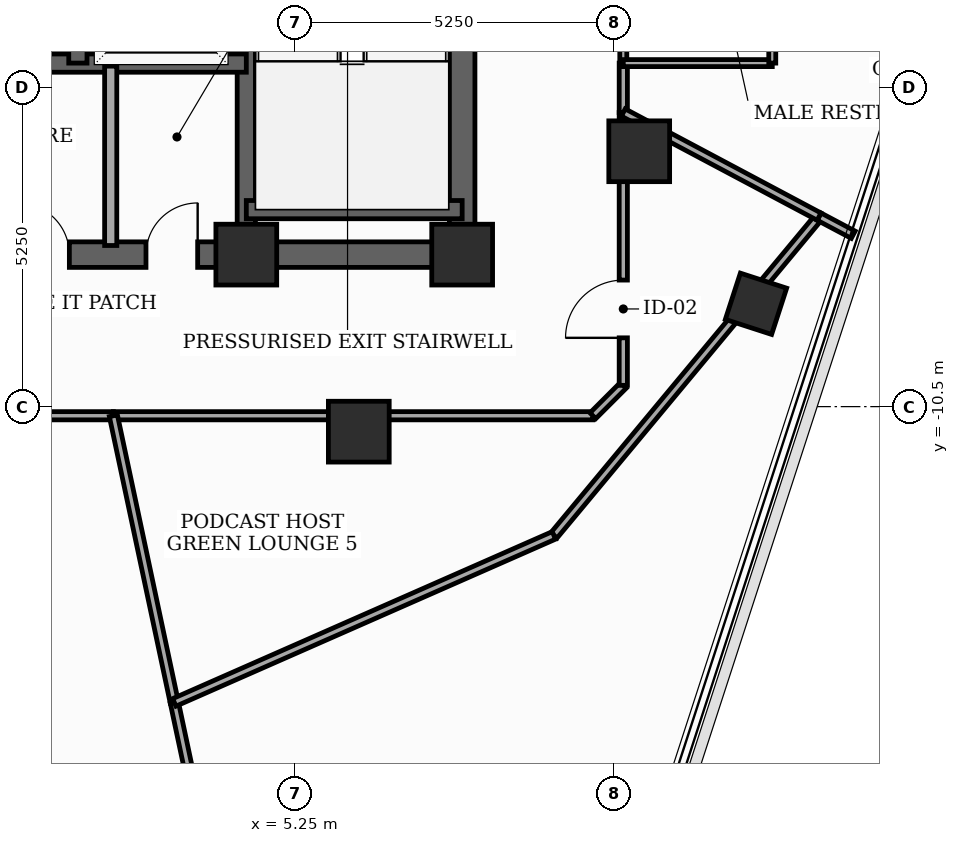
"""IFC4 building model, lengths in metres.
Left out: names, types, materials, properties, quantities, classifications, styles, units other than length and angle.
Written with IfcOpenShell. Run it as: python <this file> out.ifc"""

import sys

from ifc_helpers import new_model, si_unit, direction, frame, frame_2d, origin, origin_2d, place, context, subcontext, project, spatial, rectangle, extrude, element, fill, save


model = new_model("IFC4")
c1 = context("Model", 3, precision=1e-05, world=origin(), true_north=direction((0.0, 1.0)))
c2 = subcontext(c1, "Body", "Model", "MODEL_VIEW")
j1 = project(units=[si_unit("LENGTHUNIT", "METRE"), si_unit("PLANEANGLEUNIT", "RADIAN")], contexts=[c1])
p1 = place(None, origin())
s1 = spatial("IfcSite", under=j1, at=p1, CompositionType="ELEMENT")
p2 = place(p1, origin())
s2 = spatial("IfcBuilding", under=s1, at=p2, CompositionType="ELEMENT")
p3 = place(p2, frame((0.0, 0.0, 309.1)))
s3 = spatial("IfcBuildingStorey", under=s2, at=p3, CompositionType="ELEMENT", Elevation=309.1)
for number, where, z_axis, x_axis in (
    (1, (4.45, -8.0, 0.0), (0.0, 0.0, 1.0), (1.0, 0.0, 0.0)),
    (2, (8.0, -8.0, 0.0), (0.0, 0.0, 1.0), (1.0, 0.0, 0.0)),
    (3, (6.3, -10.912, 0.0), (0.0, 0.0, 1.0), (1.0, 0.0, 0.0)),
    (4, (10.912, -6.3, 0.0), (0.0, 0.0, 1.0), (1.0, 0.0, 0.0)),
):
    element("IfcColumn", number, at=place(p3, frame(where, z_axis=z_axis, x_axis=x_axis)), inside=s3, PredefinedType="COLUMN", context=c2, shape_type="SweptSolid", body=[
        extrude(rectangle(XDim=1.0, YDim=1.0, at=origin_2d()), origin(), (0.0, 0.0, 1.0), 3.7),
    ])
p4 = place(p3, frame((12.833, -8.809, 0.0), z_axis=(0.0, 0.0, 1.0), x_axis=(0.309016994375, 0.951056516295, 0.0)))
e5 = element("IfcColumn", 5, at=p4, inside=s3, PredefinedType="COLUMN", context=c2, shape_type="SweptSolid", body=[
    extrude(rectangle(XDim=0.8, YDim=0.8, at=origin_2d()), origin(), (0.0, 0.0, 1.0), 3.7),
])
p5 = place(p3, frame((8.0, -8.0, 0.0), z_axis=(0.0, 0.0, 1.0), x_axis=(0.0, 1.0, 0.0)))
e6 = element("IfcWall", 6, at=p5, inside=s3, PredefinedType="SHEAR", context=c2, shape_type="SweptSolid", body=[
    extrude(rectangle(XDim=16.0, YDim=0.42, at=frame_2d((8.0, 0.0))), origin(), (0.0, 0.0, 1.0), 3.44),
])
p6 = place(p5, frame((9.6, 0.0, 0.0)))
e7 = element("IfcOpeningElement", 7, at=p6, cuts=e6, PredefinedType="OPENING", context=c2, shape_type="SweptSolid", body=[
    extrude(rectangle(XDim=1.05, YDim=2.15, at=frame_2d((0.525, 1.075))), frame((0.0, 0.22, 0.0), z_axis=(0.0, -1.0, 0.0), x_axis=(1.0, 0.0, 0.0)), (0.0, 0.0, 1.0), 0.44),
])
p7 = place(p5, frame((14.469, 0.0, 0.0)))
e8 = element("IfcOpeningElement", 8, at=p7, cuts=e6, PredefinedType="OPENING", context=c2, shape_type="SweptSolid", body=[
    extrude(rectangle(XDim=0.85, YDim=2.02, at=frame_2d((0.425, 1.01))), frame((0.0, 0.22, 0.0), z_axis=(0.0, -1.0, 0.0), x_axis=(1.0, 0.0, 0.0)), (0.0, 0.0, 1.0), 0.44),
])
p8 = place(p3, frame((-8.0, -8.0, 0.0), z_axis=(0.0, 0.0, 1.0), x_axis=(1.0, 0.0, 0.0)))
e9 = element("IfcWall", 9, at=p8, inside=s3, PredefinedType="SHEAR", context=c2, shape_type="SweptSolid", body=[
    extrude(rectangle(XDim=16.0, YDim=0.42, at=frame_2d((8.0, 0.0))), origin(), (0.0, 0.0, 1.0), 3.44),
])
p9 = place(p8, frame((4.35, 0.0, 0.0)))
e10 = element("IfcOpeningElement", 10, at=p9, cuts=e9, PredefinedType="OPENING", context=c2, shape_type="SweptSolid", body=[
    extrude(rectangle(XDim=0.85, YDim=2.02, at=frame_2d((0.425, 1.01))), frame((0.0, 0.22, 0.0), z_axis=(0.0, -1.0, 0.0), x_axis=(1.0, 0.0, 0.0)), (0.0, 0.0, 1.0), 0.44),
])
p10 = place(p8, frame((6.49, 0.0, 0.0)))
e11 = element("IfcOpeningElement", 11, at=p10, cuts=e9, PredefinedType="OPENING", context=c2, shape_type="SweptSolid", body=[
    extrude(rectangle(XDim=0.85, YDim=2.02, at=frame_2d((0.425, 1.01))), frame((0.0, 0.22, 0.0), z_axis=(0.0, -1.0, 0.0), x_axis=(1.0, 0.0, 0.0)), (0.0, 0.0, 1.0), 0.44),
])
p11 = place(p8, frame((8.69, 0.0, 0.0)))
e12 = element("IfcOpeningElement", 12, at=p11, cuts=e9, PredefinedType="OPENING", context=c2, shape_type="SweptSolid", body=[
    extrude(rectangle(XDim=0.85, YDim=2.02, at=frame_2d((0.425, 1.01))), frame((0.0, 0.22, 0.0), z_axis=(0.0, -1.0, 0.0), x_axis=(1.0, 0.0, 0.0)), (0.0, 0.0, 1.0), 0.44),
])
p12 = place(p8, frame((10.8, 0.0, 0.0)))
e13 = element("IfcOpeningElement", 13, at=p12, cuts=e9, PredefinedType="OPENING", context=c2, shape_type="SweptSolid", body=[
    extrude(rectangle(XDim=0.85, YDim=2.02, at=frame_2d((0.425, 1.01))), frame((0.0, 0.22, 0.0), z_axis=(0.0, -1.0, 0.0), x_axis=(1.0, 0.0, 0.0)), (0.0, 0.0, 1.0), 0.44),
])
p13 = place(p3, frame((4.45, -7.79, 0.0), z_axis=(0.0, 0.0, 1.0), x_axis=(0.0, 1.0, 0.0)))
e14 = element("IfcWall", 14, at=p13, inside=s3, PredefinedType="SHEAR", context=c2, shape_type="SweptSolid", body=[
    extrude(rectangle(XDim=15.58, YDim=0.3, at=frame_2d((7.79, 0.0))), origin(), (0.0, 0.0, 1.0), 3.44),
])
p14 = place(p3, frame((4.45, -7.26, 0.0), z_axis=(0.0, 0.0, 1.0), x_axis=(1.0, 0.0, 0.0)))
e15 = element("IfcWall", 15, at=p14, inside=s3, PredefinedType="SHEAR", context=c2, shape_type="SweptSolid", body=[
    extrude(rectangle(XDim=3.55, YDim=0.3, at=frame_2d((1.775, 0.0))), origin(), (0.0, 0.0, 1.0), 3.44),
])
p15 = place(p3, frame((-4.45, -4.85, 0.0), z_axis=(0.0, 0.0, 1.0), x_axis=(1.0, 0.0, 0.0)))
e16 = element("IfcWall", 16, at=p15, inside=s3, PredefinedType="SHEAR", context=c2, shape_type="SweptSolid", body=[
    extrude(rectangle(XDim=8.9, YDim=0.3, at=frame_2d((4.45, 0.0))), origin(), (0.0, 0.0, 1.0), 3.44),
])
p16 = place(p3, frame((1.68, -4.85, 0.0), z_axis=(0.0, 0.0, 1.0), x_axis=(0.0, 1.0, 0.0)))
e17 = element("IfcWall", 17, at=p16, inside=s3, PredefinedType="SHEAR", context=c2, shape_type="SweptSolid", body=[
    extrude(rectangle(XDim=12.64, YDim=0.3, at=frame_2d((6.32, 0.0))), origin(), (0.0, 0.0, 1.0), 3.44),
])
p17 = place(p16, frame((0.55, 0.0, 0.0)))
e18 = element("IfcOpeningElement", 18, at=p17, cuts=e17, PredefinedType="OPENING", context=c2, shape_type="SweptSolid", body=[
    extrude(rectangle(XDim=1.1, YDim=2.1, at=frame_2d((0.55, 1.05))), frame((0.0, 0.16, 0.0), z_axis=(0.0, -1.0, 0.0), x_axis=(1.0, 0.0, 0.0)), (0.0, 0.0, 1.0), 0.32),
])
p18 = place(p16, frame((2.65, 0.0, 0.0)))
e19 = element("IfcOpeningElement", 19, at=p18, cuts=e17, PredefinedType="OPENING", context=c2, shape_type="SweptSolid", body=[
    extrude(rectangle(XDim=1.1, YDim=2.1, at=frame_2d((0.55, 1.05))), frame((0.0, 0.16, 0.0), z_axis=(0.0, -1.0, 0.0), x_axis=(1.0, 0.0, 0.0)), (0.0, 0.0, 1.0), 0.32),
])
p19 = place(p16, frame((4.75, 0.0, 0.0)))
e20 = element("IfcOpeningElement", 20, at=p19, cuts=e17, PredefinedType="OPENING", context=c2, shape_type="SweptSolid", body=[
    extrude(rectangle(XDim=1.1, YDim=2.1, at=frame_2d((0.55, 1.05))), frame((0.0, 0.16, 0.0), z_axis=(0.0, -1.0, 0.0), x_axis=(1.0, 0.0, 0.0)), (0.0, 0.0, 1.0), 0.32),
])
p20 = place(p16, frame((8.2, 0.0, 0.0)))
e21 = element("IfcOpeningElement", 21, at=p20, cuts=e17, PredefinedType="OPENING", context=c2, shape_type="SweptSolid", body=[
    extrude(rectangle(XDim=0.95, YDim=2.1, at=frame_2d((0.475, 1.05))), frame((0.0, 0.16, 0.0), z_axis=(0.0, -1.0, 0.0), x_axis=(1.0, 0.0, 0.0)), (0.0, 0.0, 1.0), 0.32),
])
p21 = place(p16, frame((11.25, 0.0, 0.0)))
e22 = element("IfcOpeningElement", 22, at=p21, cuts=e17, PredefinedType="OPENING", context=c2, shape_type="SweptSolid", body=[
    extrude(rectangle(XDim=0.95, YDim=2.1, at=frame_2d((0.475, 1.05))), frame((0.0, 0.16, 0.0), z_axis=(0.0, -1.0, 0.0), x_axis=(1.0, 0.0, 0.0)), (0.0, 0.0, 1.0), 0.32),
])
p22 = place(p3, frame((2.22, -7.85, 0.0), z_axis=(0.0, 0.0, 1.0), x_axis=(0.0, 1.0, 0.0)))
e23 = element("IfcWall", 23, at=p22, inside=s3, PredefinedType="SOLIDWALL", context=c2, shape_type="SweptSolid", body=[
    extrude(rectangle(XDim=2.95, YDim=0.2, at=frame_2d((1.475, 0.0))), origin(), (0.0, 0.0, 1.0), 2.825),
])
p23 = place(p3, frame((-5.194, -10.65, 0.0), z_axis=(0.0, 0.0, 1.0), x_axis=(1.0, 0.0, 0.0)))
e24 = element("IfcWall", 24, at=p23, inside=s3, PredefinedType="PARTITIONING", context=c2, shape_type="SweptSolid", body=[
    extrude(rectangle(XDim=7.458, YDim=0.135, at=frame_2d((3.729, 0.0))), origin(), (0.0, 0.0, 1.0), 2.04),
])
p24 = place(p23, frame((3.254, 0.0, 0.0)))
e25 = element("IfcOpeningElement", 25, at=p24, cuts=e24, PredefinedType="OPENING", context=c2, shape_type="SweptSolid", body=[
    extrude(rectangle(XDim=0.95, YDim=2.0, at=frame_2d((0.475, 1.0))), frame((0.0, 0.077, 0.0), z_axis=(0.0, -1.0, 0.0), x_axis=(1.0, 0.0, 0.0)), (0.0, 0.0, 1.0), 0.155),
])
p25 = place(p3, frame((2.264, -10.65, 0.0), z_axis=(0.0, 0.0, 1.0), x_axis=(1.0, 0.0, 0.0)))
e26 = element("IfcWall", 26, at=p25, inside=s3, PredefinedType="PARTITIONING", context=c2, shape_type="SweptSolid", body=[
    extrude(rectangle(XDim=7.886, YDim=0.135, at=frame_2d((3.943, 0.0))), origin(), (0.0, 0.0, 1.0), 2.04),
])
p26 = place(p3, frame((10.15, -10.65, 0.0), z_axis=(0.0, 0.0, 1.0), x_axis=(0.707106781187, 0.707106781187, 0.0)))
e27 = element("IfcWall", 27, at=p26, inside=s3, PredefinedType="PARTITIONING", context=c2, shape_type="SweptSolid", body=[
    extrude(rectangle(XDim=0.707, YDim=0.135, at=frame_2d((0.354, 0.0))), origin(), (0.0, 0.0, 1.0), 3.44),
])
p27 = place(p3, frame((10.65, -10.15, 0.0), z_axis=(0.0, 0.0, 1.0), x_axis=(0.0, 1.0, 0.0)))
e28 = element("IfcWall", 28, at=p27, inside=s3, PredefinedType="PARTITIONING", context=c2, shape_type="SweptSolid", body=[
    extrude(rectangle(XDim=4.487, YDim=0.135, at=frame_2d((2.243, 0.0))), origin(), (0.0, 0.0, 1.0), 2.04),
])
p28 = place(p27, frame((0.781, 0.0, 0.0)))
e29 = element("IfcOpeningElement", 29, at=p28, cuts=e28, PredefinedType="OPENING", context=c2, shape_type="SweptSolid", body=[
    extrude(rectangle(XDim=0.95, YDim=2.0, at=frame_2d((0.475, 1.0))), frame((0.0, 0.077, 0.0), z_axis=(0.0, -1.0, 0.0), x_axis=(1.0, 0.0, 0.0)), (0.0, 0.0, 1.0), 0.155),
])
p29 = place(p3, frame((10.65, -4.85, 0.0), z_axis=(0.0, 0.0, 1.0), x_axis=(0.0, 1.0, 0.0)))
e30 = element("IfcWall", 30, at=p29, inside=s3, PredefinedType="PARTITIONING", context=c2, shape_type="SweptSolid", body=[
    extrude(rectangle(XDim=2.4, YDim=0.115, at=frame_2d((1.2, 0.0))), origin(), (0.0, 0.0, 1.0), 3.44),
])
p30 = place(p29, frame((0.74, 0.0, 0.0)))
e31 = element("IfcOpeningElement", 31, at=p30, cuts=e30, PredefinedType="OPENING", context=c2, shape_type="SweptSolid", body=[
    extrude(rectangle(XDim=0.92, YDim=2.1, at=frame_2d((0.46, 1.05))), frame((0.0, 0.067, 0.0), z_axis=(0.0, -1.0, 0.0), x_axis=(1.0, 0.0, 0.0)), (0.0, 0.0, 1.0), 0.135),
])
p31 = place(p3, frame((10.65, -5.663, 0.0), z_axis=(0.0, 0.0, 1.0), x_axis=(0.0, 1.0, 0.0)))
e32 = element("IfcWall", 32, at=p31, inside=s3, PredefinedType="PARTITIONING", context=c2, shape_type="SweptSolid", body=[
    extrude(rectangle(XDim=0.813, YDim=0.135, at=frame_2d((0.406, 0.0))), origin(), (0.0, 0.0, 1.0), 3.44),
])
p32 = place(p3, frame((5.994, -28.2, 0.0), z_axis=(0.0, 0.0, 1.0), x_axis=(-0.207870549956, 0.97815634459, 0.0)))
e33 = element("IfcWall", 33, at=p32, inside=s3, PredefinedType="PARTITIONING", context=c2, shape_type="SweptSolid", body=[
    extrude(rectangle(XDim=13.121, YDim=0.135, at=frame_2d((6.561, 0.0))), origin(), (0.0, 0.0, 1.0), 2.04),
])
p33 = place(p32, frame((6.101, 0.0, 0.0)))
e34 = element("IfcOpeningElement", 34, at=p33, cuts=e33, PredefinedType="OPENING", context=c2, shape_type="SweptSolid", body=[
    extrude(rectangle(XDim=0.92, YDim=2.0, at=frame_2d((0.46, 1.0))), frame((0.0, 0.077, 0.0), z_axis=(0.0, -1.0, 0.0), x_axis=(1.0, 0.0, 0.0)), (0.0, 0.0, 1.0), 0.155),
])
p34 = place(p3, frame((3.266, -15.365, 0.0), z_axis=(0.0, 0.0, 1.0), x_axis=(-0.207906608775, 0.978148680942, 0.0)))
e35 = element("IfcWall", 35, at=p34, inside=s3, PredefinedType="PARTITIONING", context=c2, shape_type="SweptSolid", body=[
    extrude(rectangle(XDim=4.82, YDim=0.135, at=frame_2d((2.41, 0.0))), origin(), (0.0, 0.0, 1.0), 2.04),
])
p35 = place(p3, frame((13.87, -7.375, 0.0), z_axis=(0.0, 0.0, 1.0), x_axis=(-0.63949044568, -0.768799043888, 0.0)))
e36 = element("IfcWall", 36, at=p35, inside=s3, PredefinedType="PARTITIONING", context=c2, shape_type="SweptSolid", body=[
    extrude(rectangle(XDim=6.82, YDim=0.135, at=frame_2d((3.41, 0.0))), origin(), (0.0, 0.0, 1.0), 2.03),
])
p36 = place(p3, frame((9.509, -12.618, 0.0), z_axis=(0.0, 0.0, 1.0), x_axis=(-0.915305003879, -0.402761405641, 0.0)))
e37 = element("IfcWall", 37, at=p36, inside=s3, PredefinedType="PARTITIONING", context=c2, shape_type="SweptSolid", body=[
    extrude(rectangle(XDim=6.821, YDim=0.135, at=frame_2d((3.41, 0.0))), origin(), (0.0, 0.0, 1.0), 2.04),
])
p37 = place(p3, frame((14.432, -7.673, 0.0), z_axis=(0.0, 0.0, 1.0), x_axis=(-0.88341392232, 0.468593471839, 0.0)))
e38 = element("IfcWall", 38, at=p37, inside=s3, PredefinedType="PARTITIONING", context=c2, shape_type="SweptSolid", body=[
    extrude(rectangle(XDim=0.636, YDim=0.135, at=frame_2d((0.318, 0.0))), origin(), (0.0, 0.0, 1.0), 3.44),
])
p38 = place(p3, frame((13.87, -7.375, 0.0), z_axis=(0.0, 0.0, 1.0), x_axis=(-0.882982204984, 0.469406461057, 0.0)))
e39 = element("IfcWall", 39, at=p38, inside=s3, PredefinedType="PARTITIONING", context=c2, shape_type="SweptSolid", body=[
    extrude(rectangle(XDim=3.647, YDim=0.135, at=frame_2d((1.823, 0.0))), origin(), (0.0, 0.0, 1.0), 2.04),
])
p39 = place(p3, frame((10.65, -4.85, 0.0), z_axis=(0.0, 0.0, 1.0), x_axis=(1.0, 0.0, 0.0)))
e40 = element("IfcWall", 40, at=p39, inside=s3, PredefinedType="PARTITIONING", context=c2, shape_type="SweptSolid", body=[
    extrude(rectangle(XDim=2.45, YDim=0.115, at=frame_2d((1.225, 0.0))), origin(), (0.0, 0.0, 1.0), 2.04),
])
p40 = place(p3, frame((13.1, -4.85, 0.0), z_axis=(0.0, 0.0, 1.0), x_axis=(0.0, 1.0, 0.0)))
e41 = element("IfcWall", 41, at=p40, inside=s3, PredefinedType="PARTITIONING", context=c2, shape_type="SweptSolid", body=[
    extrude(rectangle(XDim=2.4, YDim=0.115, at=frame_2d((1.2, 0.0))), origin(), (0.0, 0.0, 1.0), 2.04),
])
p41 = place(p11, origin())
e42 = element("IfcDoor", 42, at=p41, inside=s3, OperationType="SINGLE_SWING_LEFT", PredefinedType="TRAPDOOR", context=c2, shape_type="SweptSolid", body=[
    extrude(rectangle(XDim=0.85, YDim=2.02, at=frame_2d((0.425, 1.01))), frame((0.0, 0.025, 0.0), z_axis=(0.0, -1.0, 0.0), x_axis=(1.0, 0.0, 0.0)), (0.0, 0.0, 1.0), 0.05),
])
fill(e12, e42)
p42 = place(p12, origin())
e43 = element("IfcDoor", 43, at=p42, inside=s3, OperationType="SINGLE_SWING_RIGHT", PredefinedType="TRAPDOOR", context=c2, shape_type="SweptSolid", body=[
    extrude(rectangle(XDim=0.85, YDim=2.02, at=frame_2d((0.425, 1.01))), frame((0.0, 0.025, 0.0), z_axis=(0.0, -1.0, 0.0), x_axis=(1.0, 0.0, 0.0)), (0.0, 0.0, 1.0), 0.05),
])
fill(e13, e43)
p43 = place(p28, origin())
e44 = element("IfcDoor", 44, at=p43, inside=s3, OperationType="SINGLE_SWING_LEFT", PredefinedType="DOOR", context=c2, shape_type="SweptSolid", body=[
    extrude(rectangle(XDim=0.95, YDim=2.0, at=frame_2d((0.475, 1.0))), frame((0.0, 0.025, 0.0), z_axis=(0.0, -1.0, 0.0), x_axis=(1.0, 0.0, 0.0)), (0.0, 0.0, 1.0), 0.05),
])
fill(e29, e44)
save(model, sys.argv[1])
